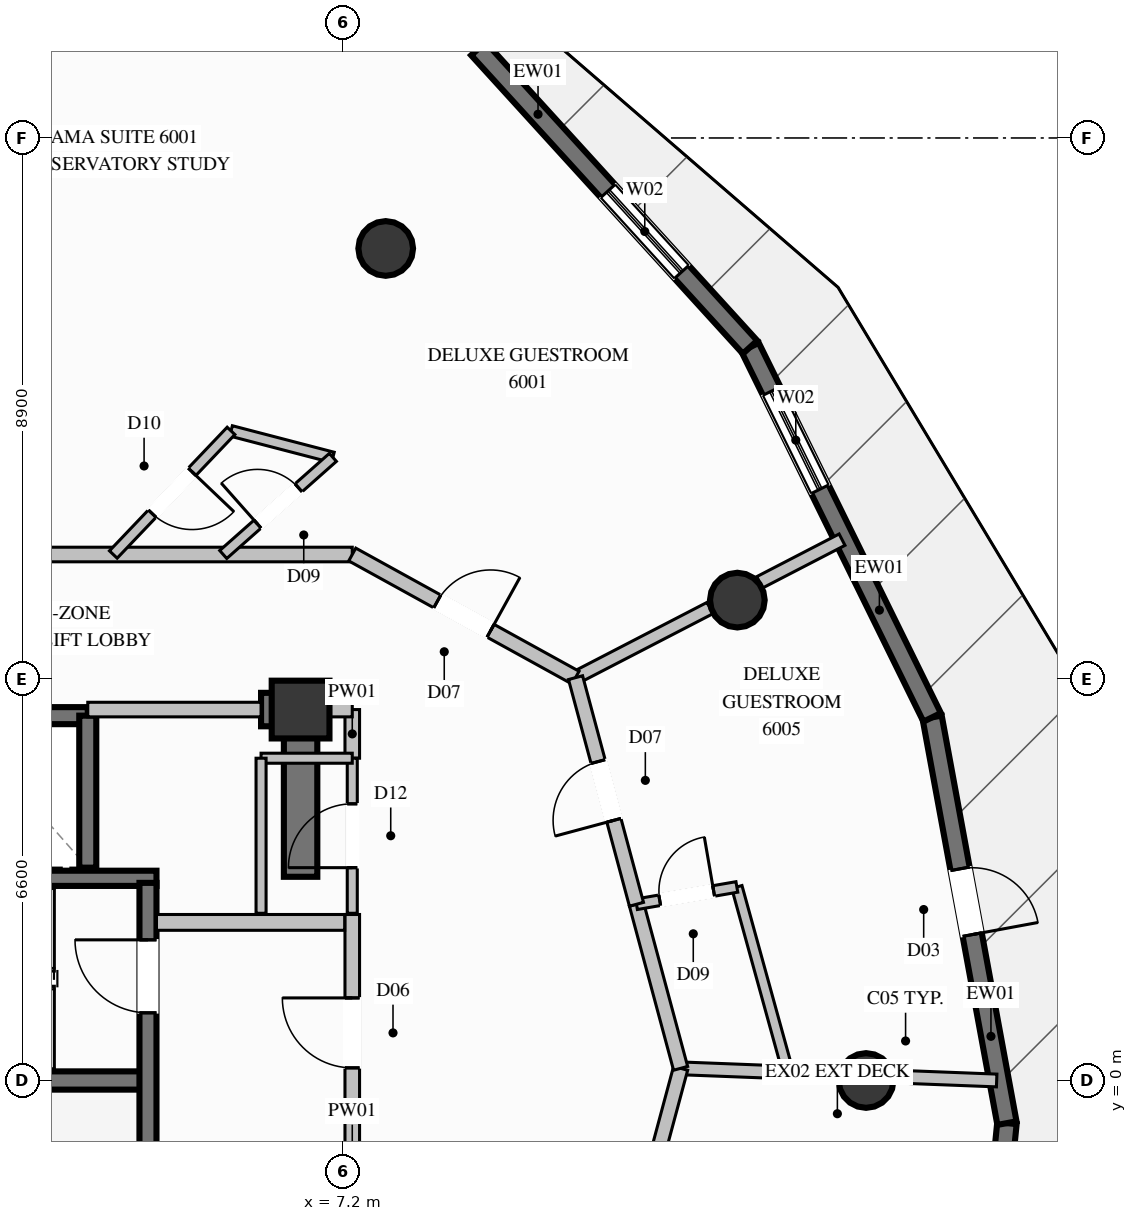
"""IFC4 building model, lengths in metres.
Left out: names, types, materials, properties, quantities, classifications, styles, units other than length and angle.
Written with IfcOpenShell. Run it as: python <this file> out.ifc"""

import sys

from ifc_helpers import new_model, si_unit, direction, frame, frame_2d, origin, origin_2d, place, context, subcontext, project, spatial, rectangle, circle, extrude, element, fill, save


model = new_model("IFC4")
c1 = context("Model", 3, precision=1e-05, world=origin(), true_north=direction((0.0, 1.0)))
c2 = subcontext(c1, "Body", "Model", "MODEL_VIEW")
j1 = project(units=[si_unit("LENGTHUNIT", "METRE"), si_unit("PLANEANGLEUNIT", "RADIAN")], contexts=[c1])
p1 = place(None, origin())
s1 = spatial("IfcSite", under=j1, at=p1, CompositionType="ELEMENT")
p2 = place(p1, origin())
s2 = spatial("IfcBuilding", under=s1, at=p2, CompositionType="ELEMENT")
p3 = place(p2, frame((0.0, 0.0, 223.6)))
s3 = spatial("IfcBuildingStorey", under=s2, at=p3, CompositionType="ELEMENT", Elevation=223.6)
p4 = place(p3, frame((6.5, 6.1, 0.0), z_axis=(0.0, 0.0, 1.0), x_axis=(1.0, 0.0, 0.0)))
e1 = element("IfcColumn", 1, at=p4, inside=s3, PredefinedType="COLUMN", context=c2, shape_type="SweptSolid", body=[
    extrude(rectangle(XDim=0.95, YDim=0.95, at=origin_2d()), origin(), (0.0, 0.0, 1.0), 3.6),
])
p5 = place(p3, frame((-3.99, 0.0, 0.0), z_axis=(0.0, 0.0, 1.0), x_axis=(1.0, 0.0, 0.0)))
e2 = element("IfcWall", 2, at=p5, inside=s3, PredefinedType="SHEAR", context=c2, shape_type="SweptSolid", body=[
    extrude(rectangle(XDim=7.98, YDim=0.3, at=frame_2d((3.99, 0.0))), origin(), (0.0, 0.0, 1.0), 3.6),
])
p6 = place(p3, frame((-4.13, 3.325, 0.0), z_axis=(0.0, 0.0, 1.0), x_axis=(1.0, 0.0, 0.0)))
e3 = element("IfcWall", 3, at=p6, inside=s3, PredefinedType="SOLIDWALL", context=c2, shape_type="SweptSolid", body=[
    extrude(rectangle(XDim=8.26, YDim=0.25, at=frame_2d((4.13, 0.0))), origin(), (0.0, 0.0, 1.0), 3.6),
])
p7 = place(p3, frame((5.85, 6.1, 0.0), z_axis=(0.0, 0.0, 1.0), x_axis=(1.0, 0.0, 0.0)))
e4 = element("IfcWall", 4, at=p7, inside=s3, PredefinedType="SHEAR", context=c2, shape_type="SweptSolid", body=[
    extrude(rectangle(XDim=0.375, YDim=0.55, at=frame_2d((0.188, 0.0))), origin(), (0.0, 0.0, 1.0), 3.6),
])
p8 = place(p3, frame((6.5, 3.35, 0.0), z_axis=(0.0, 0.0, 1.0), x_axis=(0.0, 1.0, 0.0)))
e5 = element("IfcWall", 5, at=p8, inside=s3, PredefinedType="SHEAR", context=c2, shape_type="SweptSolid", body=[
    extrude(rectangle(XDim=3.025, YDim=0.55, at=frame_2d((1.512, 0.0))), origin(), (0.0, 0.0, 1.0), 3.6),
])
for number, where, z_axis, x_axis in (
    (6, (15.8, 0.0, 0.0), (0.0, 0.0, 1.0), (1.0, 0.0, 0.0)),
    (7, (13.683, 7.9, 0.0), (0.0, 0.0, 1.0), (1.0, 0.0, 0.0)),
    (8, (7.9, 13.683, 0.0), (0.0, 0.0, 1.0), (1.0, 0.0, 0.0)),
):
    element("IfcColumn", number, at=place(p3, frame(where, z_axis=z_axis, x_axis=x_axis)), inside=s3, PredefinedType="COLUMN", context=c2, shape_type="SweptSolid", body=[
        extrude(circle(Radius=0.45, at=origin_2d()), origin(), (0.0, 0.0, 1.0), 3.6),
    ])
p9 = place(p3, frame((18.117, -0.701, 0.0), z_axis=(0.0, 0.0, 1.0), x_axis=(-0.098848078175, -0.995102536144, 0.0)))
e9 = element("IfcWall", 9, at=p9, inside=s3, PredefinedType="SOLIDWALL", context=c2, shape_type="SweptSolid", body=[
    extrude(rectangle(XDim=6.636, YDim=0.32, at=frame_2d((3.318, 0.0))), origin(), (0.0, 0.0, 1.0), 3.36),
])
p10 = place(p9, frame((2.418, 0.0, 0.35)))
e10 = element("IfcOpeningElement", 10, at=p10, cuts=e9, PredefinedType="OPENING", context=c2, shape_type="SweptSolid", body=[
    extrude(rectangle(XDim=1.8, YDim=2.6, at=frame_2d((0.9, 1.3))), frame((0.0, 0.17, 0.0), z_axis=(0.0, -1.0, 0.0), x_axis=(1.0, 0.0, 0.0)), (0.0, 0.0, 1.0), 0.34),
])
p11 = place(p3, frame((16.887, 5.972, 0.0), z_axis=(0.0, 0.0, 1.0), x_axis=(0.181272323457, -0.983432938613, 0.0)))
e11 = element("IfcWall", 11, at=p11, inside=s3, PredefinedType="SOLIDWALL", context=c2, shape_type="SweptSolid", body=[
    extrude(rectangle(XDim=6.785, YDim=0.32, at=frame_2d((3.393, 0.0))), origin(), (0.0, 0.0, 1.0), 3.36),
])
p12 = place(p11, frame((2.533, 0.0, 0.0)))
e12 = element("IfcOpeningElement", 12, at=p12, cuts=e11, PredefinedType="OPENING", context=c2, shape_type="SweptSolid", body=[
    extrude(rectangle(XDim=1.1, YDim=2.2, at=frame_2d((0.55, 1.1))), frame((0.0, 0.17, 0.0), z_axis=(0.0, -1.0, 0.0), x_axis=(1.0, 0.0, 0.0)), (0.0, 0.0, 1.0), 0.34),
])
p13 = place(p3, frame((13.892, 12.06, 0.0), z_axis=(0.0, 0.0, 1.0), x_axis=(0.441403728123, -0.897308614022, 0.0)))
e13 = element("IfcWall", 13, at=p13, inside=s3, PredefinedType="SOLIDWALL", context=c2, shape_type="SweptSolid", body=[
    extrude(rectangle(XDim=6.785, YDim=0.32, at=frame_2d((3.393, 0.0))), origin(), (0.0, 0.0, 1.0), 3.36),
])
p14 = place(p13, frame((0.804, 0.0, 0.35)))
e14 = element("IfcOpeningElement", 14, at=p14, cuts=e13, PredefinedType="OPENING", context=c2, shape_type="SweptSolid", body=[
    extrude(rectangle(XDim=1.8, YDim=2.6, at=frame_2d((0.9, 1.3))), frame((0.0, 0.17, 0.0), z_axis=(0.0, -1.0, 0.0), x_axis=(1.0, 0.0, 0.0)), (0.0, 0.0, 1.0), 0.34),
])
p15 = place(p3, frame((9.424, 16.968, 0.0), z_axis=(0.0, 0.0, 1.0), x_axis=(0.673187110457, -0.739472186302, 0.0)))
e15 = element("IfcWall", 15, at=p15, inside=s3, PredefinedType="SOLIDWALL", context=c2, shape_type="SweptSolid", body=[
    extrude(rectangle(XDim=6.637, YDim=0.32, at=frame_2d((3.319, 0.0))), origin(), (0.0, 0.0, 1.0), 3.36),
])
p16 = place(p15, frame((3.165, 0.0, 0.35)))
e16 = element("IfcOpeningElement", 16, at=p16, cuts=e15, PredefinedType="OPENING", context=c2, shape_type="SweptSolid", body=[
    extrude(rectangle(XDim=1.8, YDim=2.6, at=frame_2d((0.9, 1.3))), frame((0.0, 0.17, 0.0), z_axis=(0.0, -1.0, 0.0), x_axis=(1.0, 0.0, 0.0)), (0.0, 0.0, 1.0), 0.34),
])
p17 = place(p3, frame((3.0, 6.0, 0.0), z_axis=(0.0, 0.0, 1.0), x_axis=(-1.0, 0.0, 0.0)))
e17 = element("IfcWall", 17, at=p17, inside=s3, PredefinedType="SOLIDWALL", context=c2, shape_type="SweptSolid", body=[
    extrude(rectangle(XDim=2.2, YDim=0.28, at=frame_2d((1.1, 0.0))), origin(), (0.0, 0.0, 1.0), 3.36),
])
p18 = place(p3, frame((3.0, 3.5, 0.0), z_axis=(0.0, 0.0, 1.0), x_axis=(0.0, 1.0, 0.0)))
e18 = element("IfcWall", 18, at=p18, inside=s3, PredefinedType="SOLIDWALL", context=c2, shape_type="SweptSolid", body=[
    extrude(rectangle(XDim=2.5, YDim=0.28, at=frame_2d((1.25, 0.0))), origin(), (0.0, 0.0, 1.0), 3.36),
])
p19 = place(p3, frame((3.99, -2.21, 0.0), z_axis=(0.0, 0.0, 1.0), x_axis=(0.0, 1.0, 0.0)))
e19 = element("IfcWall", 19, at=p19, inside=s3, PredefinedType="SOLIDWALL", context=c2, shape_type="SweptSolid", body=[
    extrude(rectangle(XDim=5.46, YDim=0.28, at=frame_2d((2.73, 0.0))), origin(), (0.0, 0.0, 1.0), 3.36),
])
p20 = place(p19, frame((3.323, 0.0, 0.0)))
e20 = element("IfcOpeningElement", 20, at=p20, cuts=e19, PredefinedType="OPENING", context=c2, shape_type="SweptSolid", body=[
    extrude(rectangle(XDim=1.2, YDim=2.2, at=frame_2d((0.6, 1.1))), frame((0.0, 0.15, 0.0), z_axis=(0.0, -1.0, 0.0), x_axis=(1.0, 0.0, 0.0)), (0.0, 0.0, 1.0), 0.3),
])
p21 = place(p3, frame((7.35, -2.34, 0.0), z_axis=(0.0, 0.0, 1.0), x_axis=(0.0, 1.0, 0.0)))
e21 = element("IfcWall", 21, at=p21, inside=s3, PredefinedType="PARTITIONING", context=c2, shape_type="SweptSolid", body=[
    extrude(rectangle(XDim=5.07, YDim=0.24, at=frame_2d((2.535, 0.0))), origin(), (0.0, 0.0, 1.0), 2.445),
])
p22 = place(p21, frame((2.548, 0.0, 0.0)))
e22 = element("IfcOpeningElement", 22, at=p22, cuts=e21, PredefinedType="OPENING", context=c2, shape_type="SweptSolid", body=[
    extrude(rectangle(XDim=1.15, YDim=2.2, at=frame_2d((0.575, 1.1))), frame((0.0, 0.13, 0.0), z_axis=(0.0, -1.0, 0.0), x_axis=(1.0, 0.0, 0.0)), (0.0, 0.0, 1.0), 0.26),
])
p23 = place(p3, frame((4.13, 2.6, 0.0), z_axis=(0.0, 0.0, 1.0), x_axis=(1.0, 0.0, 0.0)))
e23 = element("IfcWall", 23, at=p23, inside=s3, PredefinedType="PARTITIONING", context=c2, shape_type="SweptSolid", body=[
    extrude(rectangle(XDim=3.095, YDim=0.26, at=frame_2d((1.548, 0.0))), origin(), (0.0, 0.0, 1.0), 3.36),
])
p24 = place(p3, frame((-5.75, 8.65, 0.0), z_axis=(0.0, 0.0, 1.0), x_axis=(1.0, 0.0, 0.0)))
e24 = element("IfcWall", 24, at=p24, inside=s3, PredefinedType="PARTITIONING", context=c2, shape_type="SweptSolid", body=[
    extrude(rectangle(XDim=13.1, YDim=0.24, at=frame_2d((6.55, 0.0))), origin(), (0.0, 0.0, 1.0), 3.36),
])
p25 = place(p3, frame((3.0, 6.1, 0.0), z_axis=(0.0, 0.0, 1.0), x_axis=(1.0, 0.0, 0.0)))
e25 = element("IfcWall", 25, at=p25, inside=s3, PredefinedType="PARTITIONING", context=c2, shape_type="SweptSolid", body=[
    extrude(rectangle(XDim=2.85, YDim=0.24, at=frame_2d((1.425, 0.0))), origin(), (0.0, 0.0, 1.0), 2.445),
])
p26 = place(p3, frame((7.35, 5.3, 0.0), z_axis=(0.0, 0.0, 1.0), x_axis=(0.0, 1.0, 0.0)))
e26 = element("IfcWall", 26, at=p26, inside=s3, PredefinedType="PARTITIONING", context=c2, shape_type="SweptSolid", body=[
    extrude(rectangle(XDim=0.8, YDim=0.24, at=frame_2d((0.4, 0.0))), origin(), (0.0, 0.0, 1.0), 2.445),
])
p27 = place(p3, frame((6.5, 6.1, 0.0), z_axis=(0.0, 0.0, 1.0), x_axis=(1.0, 0.0, 0.0)))
e27 = element("IfcWall", 27, at=p27, inside=s3, PredefinedType="PARTITIONING", context=c2, shape_type="SweptSolid", body=[
    extrude(rectangle(XDim=0.85, YDim=0.24, at=frame_2d((0.425, 0.0))), origin(), (0.0, 0.0, 1.0), 2.801),
])
p28 = place(p3, frame((7.35, 2.75, 0.0), z_axis=(0.0, 0.0, 1.0), x_axis=(0.0, 1.0, 0.0)))
e28 = element("IfcWall", 28, at=p28, inside=s3, PredefinedType="PARTITIONING", context=c2, shape_type="SweptSolid", body=[
    extrude(rectangle(XDim=2.55, YDim=0.165, at=frame_2d((1.275, 0.0))), origin(), (0.0, 0.0, 1.0), 3.36),
])
p29 = place(p28, frame((0.75, 0.0, 0.0)))
e29 = element("IfcOpeningElement", 29, at=p29, cuts=e28, PredefinedType="OPENING", context=c2, shape_type="SweptSolid", body=[
    extrude(rectangle(XDim=1.05, YDim=2.15, at=frame_2d((0.525, 1.075))), frame((0.0, 0.093, 0.0), z_axis=(0.0, -1.0, 0.0), x_axis=(1.0, 0.0, 0.0)), (0.0, 0.0, 1.0), 0.185),
])
p30 = place(p3, frame((7.35, 5.3, 0.0), z_axis=(0.0, 0.0, 1.0), x_axis=(-1.0, 0.0, 0.0)))
e30 = element("IfcWall", 30, at=p30, inside=s3, PredefinedType="PARTITIONING", context=c2, shape_type="SweptSolid", body=[
    extrude(rectangle(XDim=1.5, YDim=0.165, at=frame_2d((0.75, 0.0))), origin(), (0.0, 0.0, 1.0), 2.445),
])
p31 = place(p3, frame((5.85, 5.3, 0.0), z_axis=(0.0, 0.0, 1.0), x_axis=(0.0, -1.0, 0.0)))
e31 = element("IfcWall", 31, at=p31, inside=s3, PredefinedType="PARTITIONING", context=c2, shape_type="SweptSolid", body=[
    extrude(rectangle(XDim=2.55, YDim=0.165, at=frame_2d((1.275, 0.0))), origin(), (0.0, 0.0, 1.0), 2.445),
])
p32 = place(p3, frame((12.75, 0.2, 0.0), z_axis=(0.0, 0.0, 1.0), x_axis=(0.999258251159, -0.038509057262, 0.0)))
e32 = element("IfcWall", 32, at=p32, inside=s3, PredefinedType="PARTITIONING", context=c2, shape_type="SweptSolid", body=[
    extrude(rectangle(XDim=2.593, YDim=0.21, at=frame_2d((1.296, 0.0))), origin(), (0.0, 0.0, 1.0), 3.36),
])
p33 = place(p3, frame((16.266, 0.065, 0.0), z_axis=(0.0, 0.0, 1.0), x_axis=(0.999255378418, -0.03858352891, 0.0)))
e33 = element("IfcWall", 33, at=p33, inside=s3, PredefinedType="PARTITIONING", context=c2, shape_type="SweptSolid", body=[
    extrude(rectangle(XDim=1.683, YDim=0.21, at=frame_2d((0.842, 0.0))), origin(), (0.0, 0.0, 1.0), 3.36),
])
p34 = place(p3, frame((11.022, 6.625, 0.0), z_axis=(0.0, 0.0, 1.0), x_axis=(0.88806021567, 0.459727150975, 0.0)))
e34 = element("IfcWall", 34, at=p34, inside=s3, PredefinedType="PARTITIONING", context=c2, shape_type="SweptSolid", body=[
    extrude(rectangle(XDim=2.489, YDim=0.21, at=frame_2d((1.244, 0.0))), origin(), (0.0, 0.0, 1.0), 2.801),
])
p35 = place(p3, frame((14.051, 8.193, 0.0), z_axis=(0.0, 0.0, 1.0), x_axis=(0.888062122288, 0.459723467921, 0.0)))
e35 = element("IfcWall", 35, at=p35, inside=s3, PredefinedType="PARTITIONING", context=c2, shape_type="SweptSolid", body=[
    extrude(rectangle(XDim=1.525, YDim=0.21, at=frame_2d((0.762, 0.0))), origin(), (0.0, 0.0, 1.0), 3.36),
])
p36 = place(p3, frame((5.356, 10.683, 0.0), z_axis=(0.0, 0.0, 1.0), x_axis=(0.967748954233, -0.25191657663, 0.0)))
e36 = element("IfcWall", 36, at=p36, inside=s3, PredefinedType="PLUMBINGWALL", context=c2, shape_type="SweptSolid", body=[
    extrude(rectangle(XDim=1.731, YDim=0.175, at=frame_2d((0.865, 0.0))), origin(), (0.0, 0.0, 1.0), 3.36),
])
p37 = place(p3, frame((5.356, 10.683, 0.0), z_axis=(0.0, 0.0, 1.0), x_axis=(-0.689590027436, -0.724199968283, 0.0)))
e37 = element("IfcWall", 37, at=p37, inside=s3, PredefinedType="PLUMBINGWALL", context=c2, shape_type="SweptSolid", body=[
    extrude(rectangle(XDim=2.808, YDim=0.175, at=frame_2d((1.404, 0.0))), origin(), (0.0, 0.0, 1.0), 3.36),
])
p38 = place(p37, frame((0.929, 0.0, 0.0)))
e38 = element("IfcOpeningElement", 38, at=p38, cuts=e37, PredefinedType="OPENING", context=c2, shape_type="SweptSolid", body=[
    extrude(rectangle(XDim=0.95, YDim=2.1, at=frame_2d((0.475, 1.05))), frame((0.0, 0.098, 0.0), z_axis=(0.0, -1.0, 0.0), x_axis=(1.0, 0.0, 0.0)), (0.0, 0.0, 1.0), 0.195),
])
p39 = place(p3, frame((5.228, 8.65, 0.0), z_axis=(0.0, 0.0, 1.0), x_axis=(0.748537869346, 0.663092043502, 0.0)))
e39 = element("IfcWall", 39, at=p39, inside=s3, PredefinedType="PLUMBINGWALL", context=c2, shape_type="SweptSolid", body=[
    extrude(rectangle(XDim=2.409, YDim=0.175, at=frame_2d((1.204, 0.0))), origin(), (0.0, 0.0, 1.0), 3.36),
])
p40 = place(p39, frame((0.754, 0.0, 0.0)))
e40 = element("IfcOpeningElement", 40, at=p40, cuts=e39, PredefinedType="OPENING", context=c2, shape_type="SweptSolid", body=[
    extrude(rectangle(XDim=0.9, YDim=2.1, at=frame_2d((0.45, 1.05))), frame((0.0, 0.098, 0.0), z_axis=(0.0, -1.0, 0.0), x_axis=(1.0, 0.0, 0.0)), (0.0, 0.0, 1.0), 0.195),
])
p41 = place(p3, frame((7.35, 8.65, 0.0), z_axis=(0.0, 0.0, 1.0), x_axis=(0.875674474849, -0.482901867979, 0.0)))
e41 = element("IfcWall", 41, at=p41, inside=s3, PredefinedType="PARTITIONING", context=c2, shape_type="SweptSolid", body=[
    extrude(rectangle(XDim=4.193, YDim=0.24, at=frame_2d((2.097, 0.0))), origin(), (0.0, 0.0, 1.0), 3.36),
])
p42 = place(p41, frame((1.597, 0.0, 0.0)))
e42 = element("IfcOpeningElement", 42, at=p42, cuts=e41, PredefinedType="OPENING", context=c2, shape_type="SweptSolid", body=[
    extrude(rectangle(XDim=1.0, YDim=2.2, at=frame_2d((0.5, 1.1))), frame((0.0, 0.13, 0.0), z_axis=(0.0, -1.0, 0.0), x_axis=(1.0, 0.0, 0.0)), (0.0, 0.0, 1.0), 0.26),
])
p43 = place(p3, frame((11.748, -3.526, 0.0), z_axis=(0.0, 0.0, 1.0), x_axis=(0.259694339612, 0.965690866672, 0.0)))
e43 = element("IfcWall", 43, at=p43, inside=s3, PredefinedType="PARTITIONING", context=c2, shape_type="SweptSolid", body=[
    extrude(rectangle(XDim=3.858, YDim=0.24, at=frame_2d((1.929, 0.0))), origin(), (0.0, 0.0, 1.0), 3.36),
])
p44 = place(p43, frame((1.429, 0.0, 0.0)))
e44 = element("IfcOpeningElement", 44, at=p44, cuts=e43, PredefinedType="OPENING", context=c2, shape_type="SweptSolid", body=[
    extrude(rectangle(XDim=1.0, YDim=2.2, at=frame_2d((0.5, 1.1))), frame((0.0, 0.13, 0.0), z_axis=(0.0, -1.0, 0.0), x_axis=(1.0, 0.0, 0.0)), (0.0, 0.0, 1.0), 0.26),
])
p45 = place(p3, frame((12.75, 0.2, 0.0), z_axis=(0.0, 0.0, 1.0), x_axis=(-0.259870061474, 0.965643594267, 0.0)))
e45 = element("IfcWall", 45, at=p45, inside=s3, PredefinedType="PARTITIONING", context=c2, shape_type="SweptSolid", body=[
    extrude(rectangle(XDim=2.794, YDim=0.24, at=frame_2d((1.397, 0.0))), origin(), (0.0, 0.0, 1.0), 3.36),
])
p46 = place(p3, frame((14.517, 0.132, 0.0), z_axis=(0.0, 0.0, 1.0), x_axis=(-0.266040224846, 0.963961928068, 0.0)))
e46 = element("IfcWall", 46, at=p46, inside=s3, PredefinedType="PLUMBINGWALL", context=c2, shape_type="SweptSolid", body=[
    extrude(rectangle(XDim=3.165, YDim=0.175, at=frame_2d((1.583, 0.0))), origin(), (0.0, 0.0, 1.0), 3.36),
])
p47 = place(p3, frame((12.024, 2.898, 0.0), z_axis=(0.0, 0.0, 1.0), x_axis=(0.985412124635, 0.170185030545, 0.0)))
e47 = element("IfcWall", 47, at=p47, inside=s3, PredefinedType="PLUMBINGWALL", context=c2, shape_type="SweptSolid", body=[
    extrude(rectangle(XDim=1.676, YDim=0.175, at=frame_2d((0.838, 0.0))), origin(), (0.0, 0.0, 1.0), 3.36),
])
p48 = place(p47, frame((0.388, 0.0, 0.0)))
e48 = element("IfcOpeningElement", 48, at=p48, cuts=e47, PredefinedType="OPENING", context=c2, shape_type="SweptSolid", body=[
    extrude(rectangle(XDim=0.9, YDim=2.1, at=frame_2d((0.45, 1.05))), frame((0.0, 0.098, 0.0), z_axis=(0.0, -1.0, 0.0), x_axis=(1.0, 0.0, 0.0)), (0.0, 0.0, 1.0), 0.195),
])
p49 = place(p3, frame((12.024, 2.898, 0.0), z_axis=(0.0, 0.0, 1.0), x_axis=(-0.259615016843, 0.965712194719, 0.0)))
e49 = element("IfcWall", 49, at=p49, inside=s3, PredefinedType="PARTITIONING", context=c2, shape_type="SweptSolid", body=[
    extrude(rectangle(XDim=3.859, YDim=0.24, at=frame_2d((1.93, 0.0))), origin(), (0.0, 0.0, 1.0), 3.36),
])
p50 = place(p49, frame((1.43, 0.0, 0.0)))
e50 = element("IfcOpeningElement", 50, at=p50, cuts=e49, PredefinedType="OPENING", context=c2, shape_type="SweptSolid", body=[
    extrude(rectangle(XDim=1.0, YDim=2.2, at=frame_2d((0.5, 1.1))), frame((0.0, 0.13, 0.0), z_axis=(0.0, -1.0, 0.0), x_axis=(1.0, 0.0, 0.0)), (0.0, 0.0, 1.0), 0.26),
])
p51 = place(p12, origin())
e51 = element("IfcDoor", 51, at=p51, inside=s3, OperationType="SINGLE_SWING_RIGHT", PredefinedType="DOOR", context=c2, shape_type="SweptSolid", body=[
    extrude(rectangle(XDim=1.1, YDim=2.2, at=frame_2d((0.55, 1.1))), frame((0.0, 0.025, 0.0), z_axis=(0.0, -1.0, 0.0), x_axis=(1.0, 0.0, 0.0)), (0.0, 0.0, 1.0), 0.05),
])
fill(e12, e51)
p52 = place(p14, origin())
e52 = element("IfcWindow", 52, at=p52, inside=s3, PartitioningType="SINGLE_PANEL", PredefinedType="WINDOW", context=c2, shape_type="SweptSolid", body=[
    extrude(rectangle(XDim=1.8, YDim=2.6, at=frame_2d((0.9, 1.3))), frame((0.0, 0.03, 0.0), z_axis=(0.0, -1.0, 0.0), x_axis=(1.0, 0.0, 0.0)), (0.0, 0.0, 1.0), 0.06),
])
fill(e14, e52)
p53 = place(p16, origin())
e53 = element("IfcWindow", 53, at=p53, inside=s3, PartitioningType="SINGLE_PANEL", PredefinedType="WINDOW", context=c2, shape_type="SweptSolid", body=[
    extrude(rectangle(XDim=1.8, YDim=2.6, at=frame_2d((0.9, 1.3))), frame((0.0, 0.03, 0.0), z_axis=(0.0, -1.0, 0.0), x_axis=(1.0, 0.0, 0.0)), (0.0, 0.0, 1.0), 0.06),
])
fill(e16, e53)
p54 = place(p20, origin())
e54 = element("IfcDoor", 54, at=p54, inside=s3, OperationType="SINGLE_SWING_RIGHT", PredefinedType="DOOR", context=c2, shape_type="SweptSolid", body=[
    extrude(rectangle(XDim=1.2, YDim=2.2, at=frame_2d((0.6, 1.1))), frame((0.0, 0.025, 0.0), z_axis=(0.0, -1.0, 0.0), x_axis=(1.0, 0.0, 0.0)), (0.0, 0.0, 1.0), 0.05),
])
fill(e20, e54)
p55 = place(p22, origin())
e55 = element("IfcDoor", 55, at=p55, inside=s3, OperationType="SINGLE_SWING_RIGHT", PredefinedType="DOOR", context=c2, shape_type="SweptSolid", body=[
    extrude(rectangle(XDim=1.15, YDim=2.2, at=frame_2d((0.575, 1.1))), frame((0.0, 0.025, 0.0), z_axis=(0.0, -1.0, 0.0), x_axis=(1.0, 0.0, 0.0)), (0.0, 0.0, 1.0), 0.05),
])
fill(e22, e55)
p56 = place(p29, origin())
e56 = element("IfcDoor", 56, at=p56, inside=s3, OperationType="SINGLE_SWING_LEFT", PredefinedType="DOOR", context=c2, shape_type="SweptSolid", body=[
    extrude(rectangle(XDim=1.05, YDim=2.15, at=frame_2d((0.525, 1.075))), frame((0.0, 0.025, 0.0), z_axis=(0.0, -1.0, 0.0), x_axis=(1.0, 0.0, 0.0)), (0.0, 0.0, 1.0), 0.05),
])
fill(e29, e56)
p57 = place(p40, origin())
e57 = element("IfcDoor", 57, at=p57, inside=s3, OperationType="SINGLE_SWING_LEFT", PredefinedType="DOOR", context=c2, shape_type="SweptSolid", body=[
    extrude(rectangle(XDim=0.9, YDim=2.1, at=frame_2d((0.45, 1.05))), frame((0.0, 0.025, 0.0), z_axis=(0.0, -1.0, 0.0), x_axis=(1.0, 0.0, 0.0)), (0.0, 0.0, 1.0), 0.05),
])
fill(e40, e57)
p58 = place(p42, origin())
e58 = element("IfcDoor", 58, at=p58, inside=s3, OperationType="SINGLE_SWING_RIGHT", PredefinedType="DOOR", context=c2, shape_type="SweptSolid", body=[
    extrude(rectangle(XDim=1.0, YDim=2.2, at=frame_2d((0.5, 1.1))), frame((0.0, 0.025, 0.0), z_axis=(0.0, -1.0, 0.0), x_axis=(1.0, 0.0, 0.0)), (0.0, 0.0, 1.0), 0.05),
])
fill(e42, e58)
p59 = place(p38, origin())
e59 = element("IfcDoor", 59, at=p59, inside=s3, OperationType="SINGLE_SWING_LEFT", PredefinedType="DOOR", context=c2, shape_type="SweptSolid", body=[
    extrude(rectangle(XDim=0.95, YDim=2.1, at=frame_2d((0.475, 1.05))), frame((0.0, 0.025, 0.0), z_axis=(0.0, -1.0, 0.0), x_axis=(1.0, 0.0, 0.0)), (0.0, 0.0, 1.0), 0.05),
])
fill(e38, e59)
p60 = place(p48, origin())
e60 = element("IfcDoor", 60, at=p60, inside=s3, OperationType="SINGLE_SWING_RIGHT", PredefinedType="DOOR", context=c2, shape_type="SweptSolid", body=[
    extrude(rectangle(XDim=0.9, YDim=2.1, at=frame_2d((0.45, 1.05))), frame((0.0, 0.025, 0.0), z_axis=(0.0, -1.0, 0.0), x_axis=(1.0, 0.0, 0.0)), (0.0, 0.0, 1.0), 0.05),
])
fill(e48, e60)
p61 = place(p50, origin())
e61 = element("IfcDoor", 61, at=p61, inside=s3, OperationType="SINGLE_SWING_LEFT", PredefinedType="DOOR", context=c2, shape_type="SweptSolid", body=[
    extrude(rectangle(XDim=1.0, YDim=2.2, at=frame_2d((0.5, 1.1))), frame((0.0, 0.025, 0.0), z_axis=(0.0, -1.0, 0.0), x_axis=(1.0, 0.0, 0.0)), (0.0, 0.0, 1.0), 0.05),
])
fill(e50, e61)
save(model, sys.argv[1])
